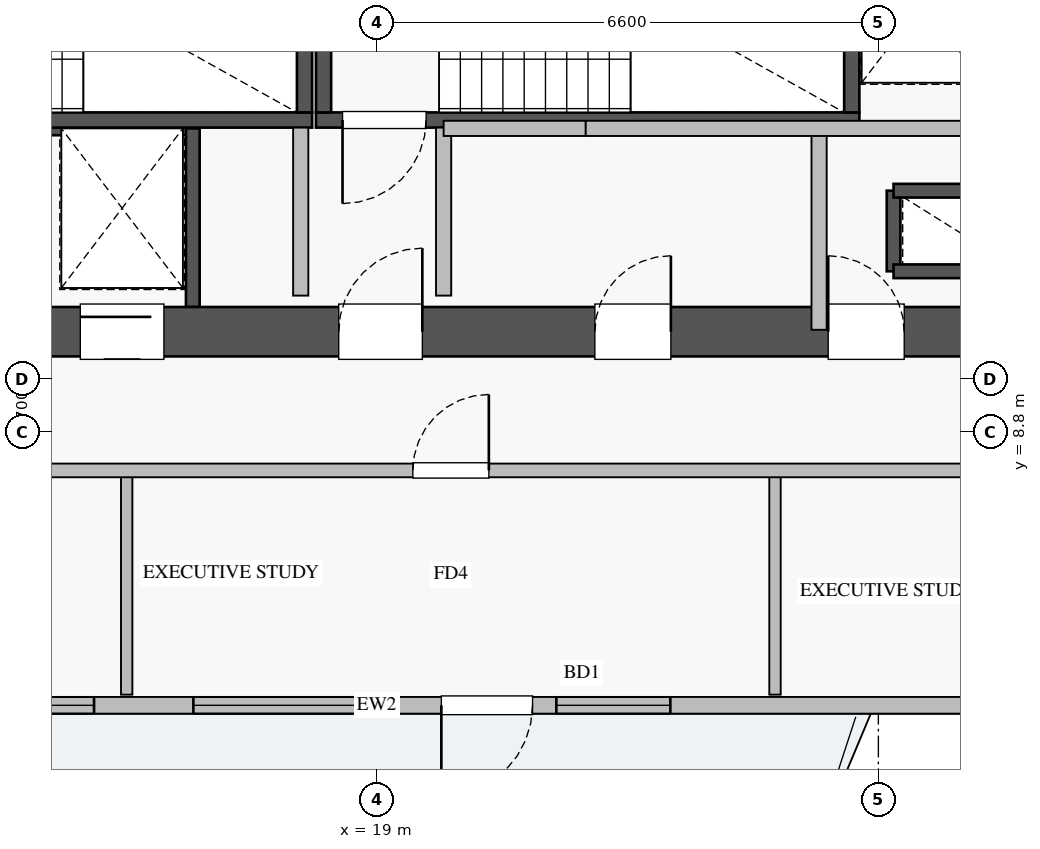
"""IFC4 building model, lengths in metres.
Left out: names, types, materials, properties, quantities, classifications, styles, units other than length and angle.
Written with IfcOpenShell. Run it as: python <this file> out.ifc"""

import sys

from ifc_helpers import new_model, si_unit, direction, frame, frame_2d, origin, place, context, subcontext, project, spatial, rectangle, extrude, source, transform, mapped, element, fill, save


model = new_model("IFC4")
c1 = context("Model", 3, precision=1e-05, world=origin(), true_north=direction((0.0, 1.0)))
c2 = subcontext(c1, "Body", "Model", "MODEL_VIEW")
j1 = project(units=[si_unit("LENGTHUNIT", "METRE"), si_unit("PLANEANGLEUNIT", "RADIAN")], contexts=[c1])
p1 = place(None, origin())
s1 = spatial("IfcSite", under=j1, at=p1, CompositionType="ELEMENT")
p2 = place(p1, origin())
s2 = spatial("IfcBuilding", under=s1, at=p2, CompositionType="ELEMENT")
p3 = place(p2, frame((0.0, 0.0, 147.0)))
s3 = spatial("IfcBuildingStorey", under=s2, at=p3, CompositionType="ELEMENT", Elevation=147.0)
p4 = place(p3, frame((25.8, 10.92, 0.0), z_axis=(0.0, 0.0, 1.0), x_axis=(0.0, 1.0, 0.0)))
e1 = element("IfcWall", 1, at=p4, inside=s3, PredefinedType="SHEAR", context=c2, shape_type="SweptSolid", body=[
    extrude(rectangle(XDim=1.06, YDim=0.18, at=frame_2d((0.53, 0.0))), origin(), (0.0, 0.0, 1.0), 3.07),
])
for number, where, z_axis, x_axis in (
    (2, (25.8, 11.98, 0.0), (0.0, 0.0, 1.0), (1.0, 0.0, 0.0)),
    (3, (25.8, 10.92, 0.0), (0.0, 0.0, 1.0), (1.0, 0.0, 0.0)),
):
    element("IfcWall", number, at=place(p3, frame(where, z_axis=z_axis, x_axis=x_axis)), inside=s3, PredefinedType="SHEAR", context=c2, shape_type="SweptSolid", body=[
        extrude(rectangle(XDim=1.35, YDim=0.18, at=frame_2d((0.675, 0.0))), origin(), (0.0, 0.0, 1.0), 3.07),
    ])
p5 = place(p3, frame((14.62, 12.8, 0.0), z_axis=(0.0, 0.0, 1.0), x_axis=(1.0, 0.0, 0.0)))
e4 = element("IfcWall", 4, at=p5, inside=s3, PredefinedType="SHEAR", context=c2, shape_type="SweptSolid", body=[
    extrude(rectangle(XDim=1.96, YDim=0.18, at=frame_2d((0.98, 0.0))), origin(), (0.0, 0.0, 1.0), 3.07),
])
p6 = place(p3, frame((16.58, 10.45, 0.0), z_axis=(0.0, 0.0, 1.0), x_axis=(0.0, 1.0, 0.0)))
e5 = element("IfcWall", 5, at=p6, inside=s3, PredefinedType="SHEAR", context=c2, shape_type="SweptSolid", body=[
    extrude(rectangle(XDim=2.35, YDim=0.18, at=frame_2d((1.175, 0.0))), origin(), (0.0, 0.0, 1.0), 3.07),
])
p7 = place(p3, frame((10.85, 12.91, 0.0), z_axis=(0.0, 0.0, 1.0), x_axis=(1.0, 0.0, 0.0)))
e6 = element("IfcWall", 6, at=p7, inside=s3, PredefinedType="SHEAR", context=c2, shape_type="SweptSolid", body=[
    extrude(rectangle(XDim=7.3, YDim=0.2, at=frame_2d((3.65, 0.0))), origin(), (0.0, 0.0, 1.0), 3.25),
])
p8 = place(p7, frame((0.35, 0.0, 0.0)))
e7 = element("IfcOpeningElement", 7, at=p8, cuts=e6, PredefinedType="OPENING", context=c2, shape_type="SweptSolid", body=[
    extrude(rectangle(XDim=1.1, YDim=2.05, at=frame_2d((0.55, 1.025))), frame((0.0, 0.11, 0.0), z_axis=(0.0, -1.0, 0.0), x_axis=(1.0, 0.0, 0.0)), (0.0, 0.0, 1.0), 0.22),
])
p9 = place(p3, frame((18.05, 13.01, 0.0), z_axis=(0.0, 0.0, 1.0), x_axis=(0.0, 1.0, 0.0)))
e8 = element("IfcWall", 8, at=p9, inside=s3, PredefinedType="SHEAR", context=c2, shape_type="SweptSolid", body=[
    extrude(rectangle(XDim=2.94, YDim=0.2, at=frame_2d((1.47, 0.0))), origin(), (0.0, 0.0, 1.0), 3.25),
])
p10 = place(p3, frame((18.2, 12.91, 0.0), z_axis=(0.0, 0.0, 1.0), x_axis=(1.0, 0.0, 0.0)))
e9 = element("IfcWall", 9, at=p10, inside=s3, PredefinedType="SHEAR", context=c2, shape_type="SweptSolid", body=[
    extrude(rectangle(XDim=7.15, YDim=0.2, at=frame_2d((3.575, 0.0))), origin(), (0.0, 0.0, 1.0), 3.25),
])
p11 = place(p10, frame((0.35, 0.0, 0.0)))
e10 = element("IfcOpeningElement", 10, at=p11, cuts=e9, PredefinedType="OPENING", context=c2, shape_type="SweptSolid", body=[
    extrude(rectangle(XDim=1.1, YDim=2.05, at=frame_2d((0.55, 1.025))), frame((0.0, 0.11, 0.0), z_axis=(0.0, -1.0, 0.0), x_axis=(1.0, 0.0, 0.0)), (0.0, 0.0, 1.0), 0.22),
])
for number, where, z_axis, x_axis in (
    (11, (18.3, 13.01, 0.0), (0.0, 0.0, 1.0), (0.0, 1.0, 0.0)),
    (12, (25.25, 13.01, 0.0), (0.0, 0.0, 1.0), (0.0, 1.0, 0.0)),
):
    element("IfcWall", number, at=place(p3, frame(where, z_axis=z_axis, x_axis=x_axis)), inside=s3, PredefinedType="SHEAR", context=c2, shape_type="SweptSolid", body=[
        extrude(rectangle(XDim=2.94, YDim=0.2, at=frame_2d((1.47, 0.0))), origin(), (0.0, 0.0, 1.0), 3.25),
    ])
p12 = place(p3, frame((10.2, 10.125, 0.0), z_axis=(0.0, 0.0, 1.0), x_axis=(1.0, 0.0, 0.0)))
e13 = element("IfcWall", 13, at=p12, inside=s3, PredefinedType="SHEAR", context=c2, shape_type="SweptSolid", body=[
    extrude(rectangle(XDim=17.6, YDim=0.65, at=frame_2d((8.8, 0.0))), origin(), (0.0, 0.0, 1.0), 3.25),
])
p13 = place(p12, frame((1.15, 0.0, 0.0)))
e14 = element("IfcOpeningElement", 14, at=p13, cuts=e13, PredefinedType="OPENING", context=c2, shape_type="SweptSolid", body=[
    extrude(rectangle(XDim=1.1, YDim=2.05, at=frame_2d((0.55, 1.025))), frame((0.0, 0.335, 0.0), z_axis=(0.0, -1.0, 0.0), x_axis=(1.0, 0.0, 0.0)), (0.0, 0.0, 1.0), 0.67),
])
p14 = place(p12, frame((8.3, 0.0, 0.0)))
e15 = element("IfcOpeningElement", 15, at=p14, cuts=e13, PredefinedType="OPENING", context=c2, shape_type="SweptSolid", body=[
    extrude(rectangle(XDim=1.1, YDim=2.05, at=frame_2d((0.55, 1.025))), frame((0.0, 0.335, 0.0), z_axis=(0.0, -1.0, 0.0), x_axis=(1.0, 0.0, 0.0)), (0.0, 0.0, 1.0), 0.67),
])
p15 = place(p12, frame((4.9, 0.0, 0.0)))
e16 = element("IfcOpeningElement", 16, at=p15, cuts=e13, PredefinedType="OPENING", context=c2, shape_type="SweptSolid", body=[
    extrude(rectangle(XDim=1.1, YDim=2.05, at=frame_2d((0.55, 1.025))), frame((0.0, 0.335, 0.0), z_axis=(0.0, -1.0, 0.0), x_axis=(1.0, 0.0, 0.0)), (0.0, 0.0, 1.0), 0.67),
])
p16 = place(p12, frame((14.74, 0.0, 0.0)))
e17 = element("IfcOpeningElement", 17, at=p16, cuts=e13, PredefinedType="OPENING", context=c2, shape_type="SweptSolid", body=[
    extrude(rectangle(XDim=1.0, YDim=2.05, at=frame_2d((0.5, 1.025))), frame((0.0, 0.335, 0.0), z_axis=(0.0, -1.0, 0.0), x_axis=(1.0, 0.0, 0.0)), (0.0, 0.0, 1.0), 0.67),
])
p17 = place(p12, frame((11.67, 0.0, 0.0)))
e18 = element("IfcOpeningElement", 18, at=p17, cuts=e13, PredefinedType="OPENING", context=c2, shape_type="SweptSolid", body=[
    extrude(rectangle(XDim=1.0, YDim=2.05, at=frame_2d((0.5, 1.025))), frame((0.0, 0.335, 0.0), z_axis=(0.0, -1.0, 0.0), x_axis=(1.0, 0.0, 0.0)), (0.0, 0.0, 1.0), 0.67),
])
p18 = place(p3, frame((6.55, 5.21, 0.0), z_axis=(0.0, 0.0, 1.0), x_axis=(1.0, 0.0, 0.0)))
e19 = element("IfcWall", 19, at=p18, inside=s3, PredefinedType="STANDARD", context=c2, shape_type="SweptSolid", body=[
    extrude(rectangle(XDim=24.9, YDim=0.22, at=frame_2d((12.45, 0.0))), origin(), (0.0, 0.0, 1.0), 2.61),
])
p19 = place(p18, frame((13.3, 0.0, 0.0)))
e20 = element("IfcOpeningElement", 20, at=p19, cuts=e19, PredefinedType="OPENING", context=c2, shape_type="SweptSolid", body=[
    extrude(rectangle(XDim=1.2, YDim=2.1, at=frame_2d((0.6, 1.05))), frame((0.0, 0.12, 0.0), z_axis=(0.0, -1.0, 0.0), x_axis=(1.0, 0.0, 0.0)), (0.0, 0.0, 1.0), 0.24),
])
p20 = place(p18, frame((0.357, 0.0, 0.9)))
e21 = element("IfcOpeningElement", 21, at=p20, cuts=e19, PredefinedType="OPENING", context=c2, shape_type="SweptSolid", body=[
    extrude(rectangle(XDim=1.5, YDim=1.5, at=frame_2d((0.75, 0.75))), frame((0.0, 0.12, 0.0), z_axis=(0.0, -1.0, 0.0), x_axis=(1.0, 0.0, 0.0)), (0.0, 0.0, 1.0), 0.24),
])
p21 = place(p18, frame((6.931, 0.0, 0.9)))
e22 = element("IfcOpeningElement", 22, at=p21, cuts=e19, PredefinedType="OPENING", context=c2, shape_type="SweptSolid", body=[
    extrude(rectangle(XDim=1.8, YDim=1.5, at=frame_2d((0.9, 0.75))), frame((0.0, 0.12, 0.0), z_axis=(0.0, -1.0, 0.0), x_axis=(1.0, 0.0, 0.0)), (0.0, 0.0, 1.0), 0.24),
])
p22 = place(p18, frame((14.813, 0.0, 0.9)))
e23 = element("IfcOpeningElement", 23, at=p22, cuts=e19, PredefinedType="OPENING", context=c2, shape_type="SweptSolid", body=[
    extrude(rectangle(XDim=1.5, YDim=1.45, at=frame_2d((0.75, 0.725))), frame((0.0, 0.12, 0.0), z_axis=(0.0, -1.0, 0.0), x_axis=(1.0, 0.0, 0.0)), (0.0, 0.0, 1.0), 0.24),
])
p23 = place(p18, frame((20.738, 0.0, 0.9)))
e24 = element("IfcOpeningElement", 24, at=p23, cuts=e19, PredefinedType="OPENING", context=c2, shape_type="SweptSolid", body=[
    extrude(rectangle(XDim=2.1, YDim=1.48, at=frame_2d((1.05, 0.74))), frame((0.0, 0.12, 0.0), z_axis=(0.0, -1.0, 0.0), x_axis=(1.0, 0.0, 0.0)), (0.0, 0.0, 1.0), 0.24),
])
p24 = place(p18, frame((4.136, 0.0, 0.9)))
e25 = element("IfcOpeningElement", 25, at=p24, cuts=e19, PredefinedType="OPENING", context=c2, shape_type="SweptSolid", body=[
    extrude(rectangle(XDim=2.4, YDim=1.5, at=frame_2d((1.2, 0.75))), frame((0.0, 0.12, 0.0), z_axis=(0.0, -1.0, 0.0), x_axis=(1.0, 0.0, 0.0)), (0.0, 0.0, 1.0), 0.24),
])
p25 = place(p18, frame((10.038, 0.0, 0.9)))
e26 = element("IfcOpeningElement", 26, at=p25, cuts=e19, PredefinedType="OPENING", context=c2, shape_type="SweptSolid", body=[
    extrude(rectangle(XDim=2.4, YDim=1.5, at=frame_2d((1.2, 0.75))), frame((0.0, 0.12, 0.0), z_axis=(0.0, -1.0, 0.0), x_axis=(1.0, 0.0, 0.0)), (0.0, 0.0, 1.0), 0.24),
])
for number, where, z_axis, x_axis in (
    (27, (18.0, 10.6, 0.0), (0.0, 0.0, 1.0), (0.0, 1.0, 0.0)),
    (28, (19.88, 10.6, 0.0), (0.0, 0.0, 1.0), (0.0, 1.0, 0.0)),
):
    element("IfcWall", number, at=place(p3, frame(where, z_axis=z_axis, x_axis=x_axis)), inside=s3, PredefinedType="PARTITIONING", context=c2, shape_type="SweptSolid", body=[
        extrude(rectangle(XDim=2.21, YDim=0.2, at=frame_2d((1.105, 0.0))), origin(), (0.0, 0.0, 1.0), 3.07),
    ])
p26 = place(p3, frame((24.82, 10.15, 0.0), z_axis=(0.0, 0.0, 1.0), x_axis=(0.0, 1.0, 0.0)))
e29 = element("IfcWall", 29, at=p26, inside=s3, PredefinedType="PARTITIONING", context=c2, shape_type="SweptSolid", body=[
    extrude(rectangle(XDim=2.65, YDim=0.2, at=frame_2d((1.325, 0.0))), origin(), (0.0, 0.0, 1.0), 3.07),
])
p27 = place(p3, frame((19.88, 12.8, 0.0), z_axis=(0.0, 0.0, 1.0), x_axis=(1.0, 0.0, 0.0)))
e30 = element("IfcWall", 30, at=p27, inside=s3, PredefinedType="PARTITIONING", context=c2, shape_type="SweptSolid", body=[
    extrude(rectangle(XDim=1.87, YDim=0.2, at=frame_2d((0.935, 0.0))), origin(), (0.0, 0.0, 1.0), 3.07),
])
p28 = place(p3, frame((21.75, 12.8, 0.0), z_axis=(0.0, 0.0, 1.0), x_axis=(1.0, 0.0, 0.0)))
e31 = element("IfcWall", 31, at=p28, inside=s3, PredefinedType="PARTITIONING", context=c2, shape_type="SweptSolid", body=[
    extrude(rectangle(XDim=5.17, YDim=0.2, at=frame_2d((2.585, 0.0))), origin(), (0.0, 0.0, 1.0), 3.07),
])
p29 = place(p3, frame((15.71, 5.35, 0.0), z_axis=(0.0, 0.0, 1.0), x_axis=(0.0, 1.0, 0.0)))
e32 = element("IfcWall", 32, at=p29, inside=s3, PredefinedType="PARTITIONING", context=c2, shape_type="SweptSolid", body=[
    extrude(rectangle(XDim=2.95, YDim=0.15, at=frame_2d((1.475, 0.0))), origin(), (0.0, 0.0, 1.0), 2.715),
])
p30 = place(p3, frame((24.24, 5.35, 0.0), z_axis=(0.0, 0.0, 1.0), x_axis=(0.0, 1.0, 0.0)))
e33 = element("IfcWall", 33, at=p30, inside=s3, PredefinedType="PARTITIONING", context=c2, shape_type="SweptSolid", body=[
    extrude(rectangle(XDim=2.95, YDim=0.15, at=frame_2d((1.475, 0.0))), origin(), (0.0, 0.0, 1.0), 3.07),
])
p31 = place(p3, frame((8.75, 8.3, 0.0), z_axis=(0.0, 0.0, 1.0), x_axis=(1.0, 0.0, 0.0)))
e34 = element("IfcWall", 34, at=p31, inside=s3, PredefinedType="PARTITIONING", context=c2, shape_type="SweptSolid", body=[
    extrude(rectangle(XDim=23.61, YDim=0.18, at=frame_2d((11.805, 0.0))), origin(), (0.0, 0.0, 1.0), 3.07),
])
p32 = place(p31, frame((2.98, 0.0, 0.0)))
e35 = element("IfcOpeningElement", 35, at=p32, cuts=e34, PredefinedType="OPENING", context=c2, shape_type="SweptSolid", body=[
    extrude(rectangle(XDim=1.0, YDim=2.05, at=frame_2d((0.5, 1.025))), frame((0.0, 0.1, 0.0), z_axis=(0.0, -1.0, 0.0), x_axis=(1.0, 0.0, 0.0)), (0.0, 0.0, 1.0), 0.2),
])
p33 = place(p31, frame((10.725, 0.0, 0.0)))
e36 = element("IfcOpeningElement", 36, at=p33, cuts=e34, PredefinedType="OPENING", context=c2, shape_type="SweptSolid", body=[
    extrude(rectangle(XDim=1.0, YDim=2.05, at=frame_2d((0.5, 1.025))), frame((0.0, 0.1, 0.0), z_axis=(0.0, -1.0, 0.0), x_axis=(1.0, 0.0, 0.0)), (0.0, 0.0, 1.0), 0.2),
])
p34 = place(p31, frame((18.86, 0.0, 0.0)))
e37 = element("IfcOpeningElement", 37, at=p34, cuts=e34, PredefinedType="OPENING", context=c2, shape_type="SweptSolid", body=[
    extrude(rectangle(XDim=1.0, YDim=2.05, at=frame_2d((0.5, 1.025))), frame((0.0, 0.1, 0.0), z_axis=(0.0, -1.0, 0.0), x_axis=(1.0, 0.0, 0.0)), (0.0, 0.0, 1.0), 0.2),
])
m1 = source(origin(), c2, "Body", "SweptSolid", [
    extrude(rectangle(XDim=1.2, YDim=2.1, at=frame_2d((0.6, 1.05))), frame((0.0, 0.025, 0.0), z_axis=(0.0, -1.0, 0.0), x_axis=(1.0, 0.0, 0.0)), (0.0, 0.0, 1.0), 0.05),
])
p35 = place(p19, frame((1.2, 0.0, 0.0), z_axis=(0.0, 0.0, 1.0), x_axis=(-1.0, 0.0, 0.0)))
e38 = element("IfcDoor", 38, at=p35, inside=s3, OperationType="SINGLE_SWING_LEFT", PredefinedType="DOOR", context=c2, shape_type="MappedRepresentation", body=[
    mapped(m1, transform((0.0, 0.0, 0.0), x_axis=(1.0, 0.0, 0.0), y_axis=(0.0, 1.0, 0.0), z_axis=(0.0, 0.0, 1.0), scale=1.0)),
])
fill(e20, e38)
m2 = source(origin(), c2, "Body", "SweptSolid", [
    extrude(rectangle(XDim=1.8, YDim=1.5, at=frame_2d((0.9, 0.75))), frame((0.0, 0.03, 0.0), z_axis=(0.0, -1.0, 0.0), x_axis=(1.0, 0.0, 0.0)), (0.0, 0.0, 1.0), 0.06),
])
p36 = place(p21, origin())
e39 = element("IfcWindow", 39, at=p36, inside=s3, PartitioningType="DOUBLE_PANEL_VERTICAL", PredefinedType="WINDOW", context=c2, shape_type="MappedRepresentation", body=[
    mapped(m2, transform((0.0, 0.0, 0.0), x_axis=(1.0, 0.0, 0.0), y_axis=(0.0, 1.0, 0.0), z_axis=(0.0, 0.0, 1.0), scale=1.0)),
])
fill(e22, e39)
m3 = source(origin(), c2, "Body", "SweptSolid", [
    extrude(rectangle(XDim=1.5, YDim=1.45, at=frame_2d((0.75, 0.725))), frame((0.0, 0.03, 0.0), z_axis=(0.0, -1.0, 0.0), x_axis=(1.0, 0.0, 0.0)), (0.0, 0.0, 1.0), 0.06),
])
p37 = place(p22, origin())
e40 = element("IfcWindow", 40, at=p37, inside=s3, PartitioningType="DOUBLE_PANEL_VERTICAL", PredefinedType="WINDOW", context=c2, shape_type="MappedRepresentation", body=[
    mapped(m3, transform((0.0, 0.0, 0.0), x_axis=(1.0, 0.0, 0.0), y_axis=(0.0, 1.0, 0.0), z_axis=(0.0, 0.0, 1.0), scale=1.0)),
])
fill(e23, e40)
m4 = source(origin(), c2, "Body", "SweptSolid", [
    extrude(rectangle(XDim=1.1, YDim=2.05, at=frame_2d((0.55, 1.025))), frame((0.0, 0.025, 0.0), z_axis=(0.0, -1.0, 0.0), x_axis=(1.0, 0.0, 0.0)), (0.0, 0.0, 1.0), 0.05),
])
p38 = place(p14, origin())
e41 = element("IfcDoor", 41, at=p38, inside=s3, OperationType="SINGLE_SWING_RIGHT", PredefinedType="DOOR", context=c2, shape_type="MappedRepresentation", body=[
    mapped(m4, transform((0.0, 0.0, 0.0), x_axis=(1.0, 0.0, 0.0), y_axis=(0.0, 1.0, 0.0), z_axis=(0.0, 0.0, 1.0), scale=1.0)),
])
fill(e15, e41)
p39 = place(p11, frame((1.1, 0.0, 0.0), z_axis=(0.0, 0.0, 1.0), x_axis=(-1.0, 0.0, 0.0)))
e42 = element("IfcDoor", 42, at=p39, inside=s3, OperationType="SINGLE_SWING_LEFT", PredefinedType="DOOR", context=c2, shape_type="MappedRepresentation", body=[
    mapped(m4, transform((0.0, 0.0, 0.0), x_axis=(1.0, 0.0, 0.0), y_axis=(0.0, 1.0, 0.0), z_axis=(0.0, 0.0, 1.0), scale=1.0)),
])
fill(e10, e42)
p40 = place(p15, origin())
e43 = element("IfcDoor", 43, at=p40, inside=s3, OperationType="SLIDING_TO_RIGHT", PredefinedType="DOOR", context=c2, shape_type="MappedRepresentation", body=[
    mapped(m4, transform((0.0, 0.0, 0.0), x_axis=(1.0, 0.0, 0.0), y_axis=(0.0, 1.0, 0.0), z_axis=(0.0, 0.0, 1.0), scale=1.0)),
])
fill(e16, e43)
m5 = source(origin(), c2, "Body", "SweptSolid", [
    extrude(rectangle(XDim=1.0, YDim=2.05, at=frame_2d((0.5, 1.025))), frame((0.0, 0.025, 0.0), z_axis=(0.0, -1.0, 0.0), x_axis=(1.0, 0.0, 0.0)), (0.0, 0.0, 1.0), 0.05),
])
p41 = place(p16, origin())
e44 = element("IfcDoor", 44, at=p41, inside=s3, OperationType="SINGLE_SWING_LEFT", PredefinedType="DOOR", context=c2, shape_type="MappedRepresentation", body=[
    mapped(m5, transform((0.0, 0.0, 0.0), x_axis=(1.0, 0.0, 0.0), y_axis=(0.0, 1.0, 0.0), z_axis=(0.0, 0.0, 1.0), scale=1.0)),
])
fill(e17, e44)
p42 = place(p17, origin())
e45 = element("IfcDoor", 45, at=p42, inside=s3, OperationType="SINGLE_SWING_RIGHT", PredefinedType="DOOR", context=c2, shape_type="MappedRepresentation", body=[
    mapped(m5, transform((0.0, 0.0, 0.0), x_axis=(1.0, 0.0, 0.0), y_axis=(0.0, 1.0, 0.0), z_axis=(0.0, 0.0, 1.0), scale=1.0)),
])
fill(e18, e45)
p43 = place(p33, origin())
e46 = element("IfcDoor", 46, at=p43, inside=s3, OperationType="SINGLE_SWING_RIGHT", PredefinedType="DOOR", context=c2, shape_type="MappedRepresentation", body=[
    mapped(m5, transform((0.0, 0.0, 0.0), x_axis=(1.0, 0.0, 0.0), y_axis=(0.0, 1.0, 0.0), z_axis=(0.0, 0.0, 1.0), scale=1.0)),
])
fill(e36, e46)
m6 = source(origin(), c2, "Body", "SweptSolid", [
    extrude(rectangle(XDim=2.4, YDim=1.5, at=frame_2d((1.2, 0.75))), frame((0.0, 0.03, 0.0), z_axis=(0.0, -1.0, 0.0), x_axis=(1.0, 0.0, 0.0)), (0.0, 0.0, 1.0), 0.06),
])
p44 = place(p25, origin())
e47 = element("IfcWindow", 47, at=p44, inside=s3, PartitioningType="TRIPLE_PANEL_VERTICAL", PredefinedType="WINDOW", context=c2, shape_type="MappedRepresentation", body=[
    mapped(m6, transform((0.0, 0.0, 0.0), x_axis=(1.0, 0.0, 0.0), y_axis=(0.0, 1.0, 0.0), z_axis=(0.0, 0.0, 1.0), scale=1.0)),
])
fill(e26, e47)
save(model, sys.argv[1])
